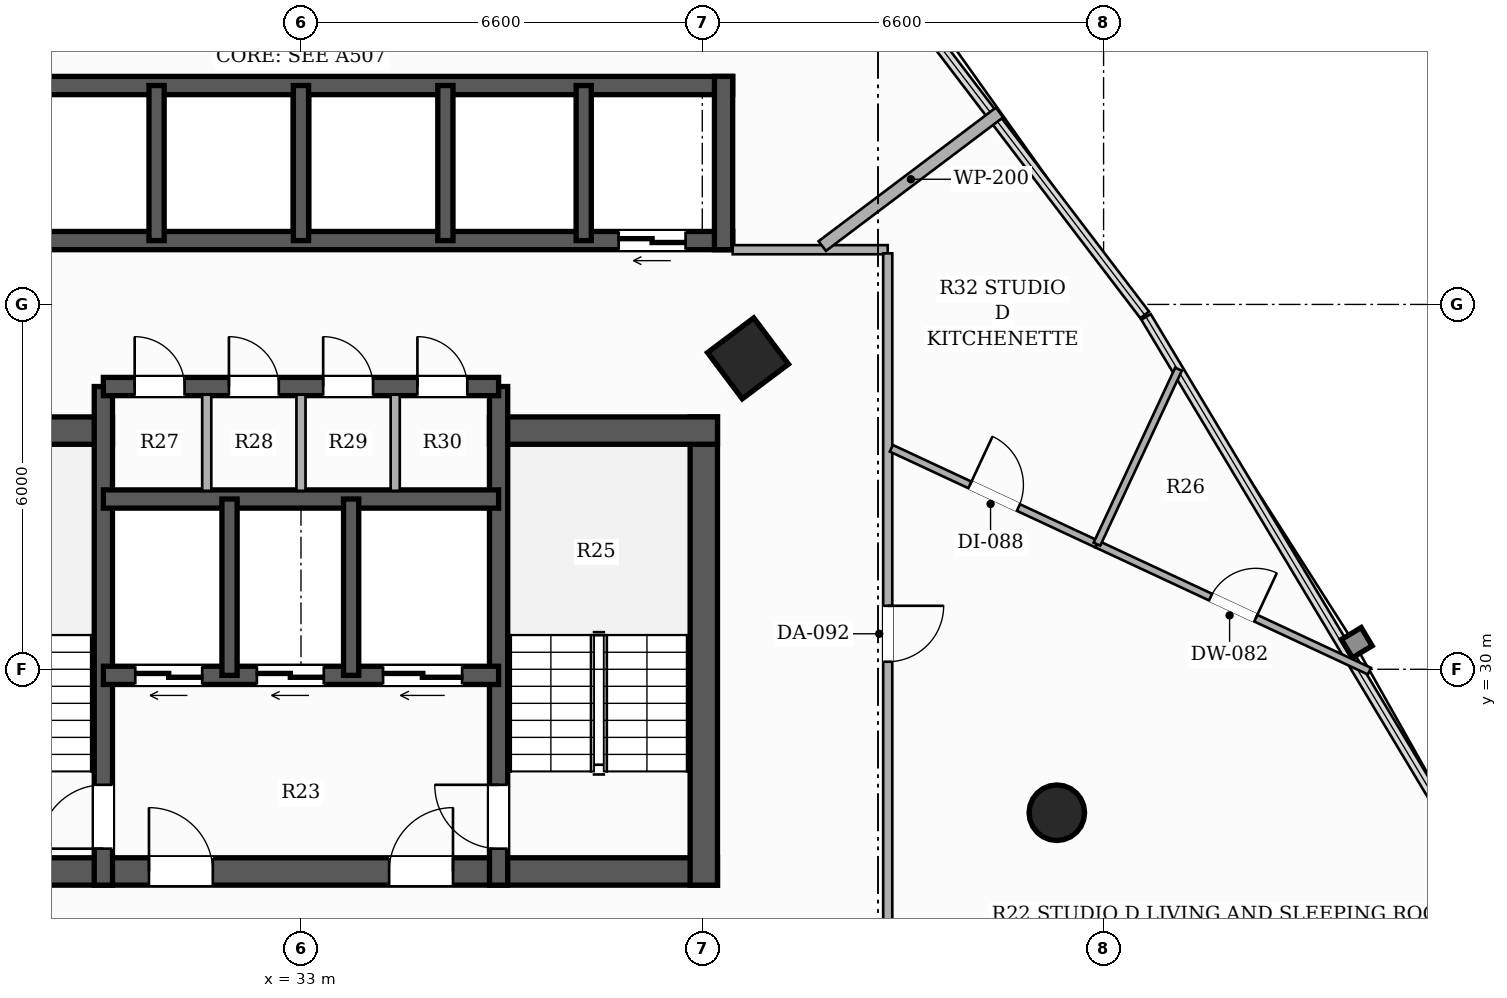
"""IFC4 building model, lengths in metres.
Left out: names, types, materials, properties, quantities, classifications, styles, units other than length and angle.
Written with IfcOpenShell. Run it as: python <this file> out.ifc"""

import sys

from ifc_helpers import new_model, si_unit, direction, frame, frame_2d, origin, origin_2d, place, context, subcontext, project, spatial, rectangle, hollow_rectangle, hollow_circle, extrude, element, fill, save


model = new_model("IFC4")
c1 = context("Model", 3, precision=1e-05, world=origin(), true_north=direction((0.0, 1.0)))
c2 = subcontext(c1, "Body", "Model", "MODEL_VIEW")
j1 = project(units=[si_unit("LENGTHUNIT", "METRE"), si_unit("PLANEANGLEUNIT", "RADIAN")], contexts=[c1])
p1 = place(None, origin())
s1 = spatial("IfcSite", under=j1, at=p1, CompositionType="ELEMENT")
p2 = place(p1, origin())
s2 = spatial("IfcBuilding", under=s1, at=p2, CompositionType="ELEMENT")
p3 = place(p2, frame((0.0, 0.0, 46.7)))
s3 = spatial("IfcBuildingStorey", under=s2, at=p3, CompositionType="ELEMENT", Elevation=46.7)
p4 = place(p3, frame((26.15, 26.675, 0.0), z_axis=(0.0, 0.0, 1.0), x_axis=(1.0, 0.0, 0.0)))
e1 = element("IfcWall", 1, at=p4, inside=s3, PredefinedType="SHEAR", context=c2, shape_type="SweptSolid", body=[
    extrude(rectangle(XDim=13.7, YDim=0.45, at=frame_2d((6.85, 0.0))), origin(), (0.0, 0.0, 1.0), 3.3),
])
p5 = place(p4, frame((4.35, 0.0, 0.0)))
e2 = element("IfcOpeningElement", 2, at=p5, cuts=e1, PredefinedType="OPENING", context=c2, shape_type="SweptSolid", body=[
    extrude(rectangle(XDim=1.05, YDim=2.15, at=frame_2d((0.525, 1.075))), frame((0.0, 0.235, 0.0), z_axis=(0.0, -1.0, 0.0), x_axis=(1.0, 0.0, 0.0)), (0.0, 0.0, 1.0), 0.47),
])
p6 = place(p4, frame((8.3, 0.0, 0.0)))
e3 = element("IfcOpeningElement", 3, at=p6, cuts=e1, PredefinedType="OPENING", context=c2, shape_type="SweptSolid", body=[
    extrude(rectangle(XDim=1.05, YDim=2.15, at=frame_2d((0.525, 1.075))), frame((0.0, 0.235, 0.0), z_axis=(0.0, -1.0, 0.0), x_axis=(1.0, 0.0, 0.0)), (0.0, 0.0, 1.0), 0.47),
])
p7 = place(p3, frame((26.15, 33.925, 0.0), z_axis=(0.0, 0.0, 1.0), x_axis=(1.0, 0.0, 0.0)))
e4 = element("IfcWall", 4, at=p7, inside=s3, PredefinedType="SHEAR", context=c2, shape_type="SweptSolid", body=[
    extrude(rectangle(XDim=3.75, YDim=0.45, at=frame_2d((1.875, 0.0))), origin(), (0.0, 0.0, 1.0), 3.3),
])
p8 = place(p3, frame((39.625, 26.45, 0.0), z_axis=(0.0, 0.0, 1.0), x_axis=(0.0, 1.0, 0.0)))
e5 = element("IfcWall", 5, at=p8, inside=s3, PredefinedType="SHEAR", context=c2, shape_type="SweptSolid", body=[
    extrude(rectangle(XDim=7.7, YDim=0.45, at=frame_2d((3.85, 0.0))), origin(), (0.0, 0.0, 1.0), 3.3),
])
p9 = place(p3, frame((36.1, 33.925, 0.0), z_axis=(0.0, 0.0, 1.0), x_axis=(1.0, 0.0, 0.0)))
e6 = element("IfcWall", 6, at=p9, inside=s3, PredefinedType="SHEAR", context=c2, shape_type="SweptSolid", body=[
    extrude(rectangle(XDim=3.75, YDim=0.45, at=frame_2d((1.875, 0.0))), origin(), (0.0, 0.0, 1.0), 3.3),
])
p10 = place(p3, frame((29.75, 26.45, 0.0), z_axis=(0.0, 0.0, 1.0), x_axis=(0.0, 1.0, 0.0)))
e7 = element("IfcWall", 7, at=p10, inside=s3, PredefinedType="SHEAR", context=c2, shape_type="SweptSolid", body=[
    extrude(rectangle(XDim=8.2, YDim=0.3, at=frame_2d((4.1, 0.0))), origin(), (0.0, 0.0, 1.0), 3.3),
])
p11 = place(p10, frame((0.6, 0.0, 0.0)))
e8 = element("IfcOpeningElement", 8, at=p11, cuts=e7, PredefinedType="OPENING", context=c2, shape_type="SweptSolid", body=[
    extrude(rectangle(XDim=1.05, YDim=2.15, at=frame_2d((0.525, 1.075))), frame((0.0, 0.16, 0.0), z_axis=(0.0, -1.0, 0.0), x_axis=(1.0, 0.0, 0.0)), (0.0, 0.0, 1.0), 0.32),
])
p12 = place(p3, frame((36.25, 26.45, 0.0), z_axis=(0.0, 0.0, 1.0), x_axis=(0.0, 1.0, 0.0)))
e9 = element("IfcWall", 9, at=p12, inside=s3, PredefinedType="SHEAR", context=c2, shape_type="SweptSolid", body=[
    extrude(rectangle(XDim=8.2, YDim=0.3, at=frame_2d((4.1, 0.0))), origin(), (0.0, 0.0, 1.0), 3.3),
])
p13 = place(p12, frame((0.6, 0.0, 0.0)))
e10 = element("IfcOpeningElement", 10, at=p13, cuts=e9, PredefinedType="OPENING", context=c2, shape_type="SweptSolid", body=[
    extrude(rectangle(XDim=1.05, YDim=2.15, at=frame_2d((0.525, 1.075))), frame((0.0, 0.16, 0.0), z_axis=(0.0, -1.0, 0.0), x_axis=(1.0, 0.0, 0.0)), (0.0, 0.0, 1.0), 0.32),
])
p14 = place(p3, frame((36.25, 29.9, 0.0), z_axis=(0.0, 0.0, 1.0), x_axis=(-1.0, 0.0, 0.0)))
e11 = element("IfcWall", 11, at=p14, inside=s3, PredefinedType="SHEAR", context=c2, shape_type="SweptSolid", body=[
    extrude(rectangle(XDim=6.5, YDim=0.3, at=frame_2d((3.25, 0.0))), origin(), (0.0, 0.0, 1.0), 3.3),
])
p15 = place(p14, frame((4.875, 0.0, 0.0)))
e12 = element("IfcOpeningElement", 12, at=p15, cuts=e11, PredefinedType="OPENING", context=c2, shape_type="SweptSolid", body=[
    extrude(rectangle(XDim=1.1, YDim=2.2, at=frame_2d((0.55, 1.1))), frame((0.0, 0.16, 0.0), z_axis=(0.0, -1.0, 0.0), x_axis=(1.0, 0.0, 0.0)), (0.0, 0.0, 1.0), 0.32),
])
p16 = place(p14, frame((2.875, 0.0, 0.0)))
e13 = element("IfcOpeningElement", 13, at=p16, cuts=e11, PredefinedType="OPENING", context=c2, shape_type="SweptSolid", body=[
    extrude(rectangle(XDim=1.1, YDim=2.2, at=frame_2d((0.55, 1.1))), frame((0.0, 0.16, 0.0), z_axis=(0.0, -1.0, 0.0), x_axis=(1.0, 0.0, 0.0)), (0.0, 0.0, 1.0), 0.32),
])
p17 = place(p14, frame((0.6, 0.0, 0.0)))
e14 = element("IfcOpeningElement", 14, at=p17, cuts=e11, PredefinedType="OPENING", context=c2, shape_type="SweptSolid", body=[
    extrude(rectangle(XDim=1.3, YDim=2.2, at=frame_2d((0.65, 1.1))), frame((0.0, 0.16, 0.0), z_axis=(0.0, -1.0, 0.0), x_axis=(1.0, 0.0, 0.0)), (0.0, 0.0, 1.0), 0.32),
])
p18 = place(p3, frame((29.75, 32.8, 0.0), z_axis=(0.0, 0.0, 1.0), x_axis=(1.0, 0.0, 0.0)))
e15 = element("IfcWall", 15, at=p18, inside=s3, PredefinedType="SHEAR", context=c2, shape_type="SweptSolid", body=[
    extrude(rectangle(XDim=6.5, YDim=0.3, at=frame_2d((3.25, 0.0))), origin(), (0.0, 0.0, 1.0), 3.3),
])
for number, where, z_axis, x_axis in (
    (16, (31.825, 29.9, 0.0), (0.0, 0.0, 1.0), (0.0, 1.0, 0.0)),
    (17, (33.825, 29.9, 0.0), (0.0, 0.0, 1.0), (0.0, 1.0, 0.0)),
):
    element("IfcWall", number, at=place(p3, frame(where, z_axis=z_axis, x_axis=x_axis)), inside=s3, PredefinedType="SHEAR", context=c2, shape_type="SweptSolid", body=[
        extrude(rectangle(XDim=2.9, YDim=0.25, at=frame_2d((1.45, 0.0))), origin(), (0.0, 0.0, 1.0), 3.3),
    ])
p19 = place(p3, frame((29.75, 34.65, 0.0), z_axis=(0.0, 0.0, 1.0), x_axis=(1.0, 0.0, 0.0)))
e18 = element("IfcWall", 18, at=p19, inside=s3, PredefinedType="SHEAR", context=c2, shape_type="SweptSolid", body=[
    extrude(rectangle(XDim=6.5, YDim=0.3, at=frame_2d((3.25, 0.0))), origin(), (0.0, 0.0, 1.0), 3.3),
])
p20 = place(p19, frame((0.515, 0.0, 0.0)))
e19 = element("IfcOpeningElement", 19, at=p20, cuts=e18, PredefinedType="OPENING", context=c2, shape_type="SweptSolid", body=[
    extrude(rectangle(XDim=0.82, YDim=2.1, at=frame_2d((0.41, 1.05))), frame((0.0, 0.16, 0.0), z_axis=(0.0, -1.0, 0.0), x_axis=(1.0, 0.0, 0.0)), (0.0, 0.0, 1.0), 0.32),
])
p21 = place(p19, frame((2.065, 0.0, 0.0)))
e20 = element("IfcOpeningElement", 20, at=p21, cuts=e18, PredefinedType="OPENING", context=c2, shape_type="SweptSolid", body=[
    extrude(rectangle(XDim=0.82, YDim=2.1, at=frame_2d((0.41, 1.05))), frame((0.0, 0.16, 0.0), z_axis=(0.0, -1.0, 0.0), x_axis=(1.0, 0.0, 0.0)), (0.0, 0.0, 1.0), 0.32),
])
p22 = place(p19, frame((3.615, 0.0, 0.0)))
e21 = element("IfcOpeningElement", 21, at=p22, cuts=e18, PredefinedType="OPENING", context=c2, shape_type="SweptSolid", body=[
    extrude(rectangle(XDim=0.82, YDim=2.1, at=frame_2d((0.41, 1.05))), frame((0.0, 0.16, 0.0), z_axis=(0.0, -1.0, 0.0), x_axis=(1.0, 0.0, 0.0)), (0.0, 0.0, 1.0), 0.32),
])
p23 = place(p19, frame((5.165, 0.0, 0.0)))
e22 = element("IfcOpeningElement", 22, at=p23, cuts=e18, PredefinedType="OPENING", context=c2, shape_type="SweptSolid", body=[
    extrude(rectangle(XDim=0.82, YDim=2.1, at=frame_2d((0.41, 1.05))), frame((0.0, 0.16, 0.0), z_axis=(0.0, -1.0, 0.0), x_axis=(1.0, 0.0, 0.0)), (0.0, 0.0, 1.0), 0.32),
])
p24 = place(p3, frame((40.1, 37.05, 0.0), z_axis=(0.0, 0.0, 1.0), x_axis=(-1.0, 0.0, 0.0)))
e23 = element("IfcWall", 23, at=p24, inside=s3, PredefinedType="SHEAR", context=c2, shape_type="SweptSolid", body=[
    extrude(rectangle(XDim=14.2, YDim=0.3, at=frame_2d((7.1, 0.0))), origin(), (0.0, 0.0, 1.0), 3.3),
])
p25 = place(p24, frame((12.325, 0.0, 0.0)))
e24 = element("IfcOpeningElement", 24, at=p25, cuts=e23, PredefinedType="OPENING", context=c2, shape_type="SweptSolid", body=[
    extrude(rectangle(XDim=1.1, YDim=2.2, at=frame_2d((0.55, 1.1))), frame((0.0, 0.16, 0.0), z_axis=(0.0, -1.0, 0.0), x_axis=(1.0, 0.0, 0.0)), (0.0, 0.0, 1.0), 0.32),
])
p26 = place(p24, frame((0.775, 0.0, 0.0)))
e25 = element("IfcOpeningElement", 25, at=p26, cuts=e23, PredefinedType="OPENING", context=c2, shape_type="SweptSolid", body=[
    extrude(rectangle(XDim=1.1, YDim=2.2, at=frame_2d((0.55, 1.1))), frame((0.0, 0.16, 0.0), z_axis=(0.0, -1.0, 0.0), x_axis=(1.0, 0.0, 0.0)), (0.0, 0.0, 1.0), 0.32),
])
p27 = place(p3, frame((25.9, 39.6, 0.0), z_axis=(0.0, 0.0, 1.0), x_axis=(1.0, 0.0, 0.0)))
e26 = element("IfcWall", 26, at=p27, inside=s3, PredefinedType="SHEAR", context=c2, shape_type="SweptSolid", body=[
    extrude(rectangle(XDim=14.2, YDim=0.3, at=frame_2d((7.1, 0.0))), origin(), (0.0, 0.0, 1.0), 3.3),
])
p28 = place(p3, frame((39.95, 36.9, 0.0), z_axis=(0.0, 0.0, 1.0), x_axis=(0.0, 1.0, 0.0)))
e27 = element("IfcWall", 27, at=p28, inside=s3, PredefinedType="SHEAR", context=c2, shape_type="SweptSolid", body=[
    extrude(rectangle(XDim=2.85, YDim=0.3, at=frame_2d((1.425, 0.0))), origin(), (0.0, 0.0, 1.0), 3.3),
])
for number, where, z_axis, x_axis in (
    (28, (30.625, 37.05, 0.0), (0.0, 0.0, 1.0), (0.0, 1.0, 0.0)),
    (29, (33.0, 37.05, 0.0), (0.0, 0.0, 1.0), (0.0, 1.0, 0.0)),
    (30, (35.375, 37.05, 0.0), (0.0, 0.0, 1.0), (0.0, 1.0, 0.0)),
    (31, (37.65, 37.05, 0.0), (0.0, 0.0, 1.0), (0.0, 1.0, 0.0)),
):
    element("IfcWall", number, at=place(p3, frame(where, z_axis=z_axis, x_axis=x_axis)), inside=s3, PredefinedType="SHEAR", context=c2, shape_type="SweptSolid", body=[
        extrude(rectangle(XDim=2.55, YDim=0.25, at=frame_2d((1.275, 0.0))), origin(), (0.0, 0.0, 1.0), 3.3),
    ])
p29 = place(p3, frame((45.431, 27.641, 0.0), z_axis=(0.0, 0.0, 1.0), x_axis=(1.0, 0.0, 0.0)))
e32 = element("IfcColumn", 32, at=p29, inside=s3, PredefinedType="COLUMN", context=c2, shape_type="SweptSolid", body=[
    extrude(hollow_circle(Radius=0.457, WallThickness=0.025, at=origin_2d()), origin(), (0.0, 0.0, 1.0), 3.3),
])
p30 = place(p3, frame((40.352, 35.113, 0.0), z_axis=(0.0, 0.0, 1.0), x_axis=(-0.600420225326, 0.799684658487, 0.0)))
e33 = element("IfcColumn", 33, at=p30, inside=s3, PredefinedType="COLUMN", context=c2, shape_type="SweptSolid", body=[
    extrude(hollow_rectangle(XDim=0.95, YDim=0.95, WallThickness=0.032, at=origin_2d()), origin(), (0.0, 0.0, 1.0), 3.3),
])
for number, where, z_axis, x_axis in (
    (34, (31.45, 32.935, 0.0), (0.0, 0.0, 1.0), (0.0, 1.0, 0.0)),
    (35, (33.0, 32.935, 0.0), (0.0, 0.0, 1.0), (0.0, 1.0, 0.0)),
    (36, (34.55, 32.935, 0.0), (0.0, 0.0, 1.0), (0.0, 1.0, 0.0)),
):
    element("IfcWall", number, at=place(p3, frame(where, z_axis=z_axis, x_axis=x_axis)), inside=s3, PredefinedType="PARTITIONING", context=c2, shape_type="SweptSolid", body=[
        extrude(rectangle(XDim=1.58, YDim=0.15, at=frame_2d((0.79, 0.0))), origin(), (0.0, 0.0, 1.0), 3.06),
    ])
p31 = place(p3, frame((40.1, 36.9, 0.0), z_axis=(0.0, 0.0, 1.0), x_axis=(1.0, 0.0, 0.0)))
e37 = element("IfcWall", 37, at=p31, inside=s3, PredefinedType="PARTITIONING", context=c2, shape_type="SweptSolid", body=[
    extrude(rectangle(XDim=2.55, YDim=0.15, at=frame_2d((1.275, 0.0))), origin(), (0.0, 0.0, 1.0), 2.413),
])
p32 = place(p3, frame((42.65, 36.84, 0.0), z_axis=(0.0, 0.0, 1.0), x_axis=(0.0, -1.0, 0.0)))
e38 = element("IfcWall", 38, at=p32, inside=s3, PredefinedType="PARTITIONING", context=c2, shape_type="SweptSolid", body=[
    extrude(rectangle(XDim=25.04, YDim=0.15, at=frame_2d((12.52, 0.0))), origin(), (0.0, 0.0, 1.0), 2.413),
])
p33 = place(p32, frame((16.466, 0.0, 0.0)))
e39 = element("IfcOpeningElement", 39, at=p33, cuts=e38, PredefinedType="OPENING", context=c2, shape_type="SweptSolid", body=[
    extrude(rectangle(XDim=0.92, YDim=2.15, at=frame_2d((0.46, 1.075))), frame((0.0, 0.085, 0.0), z_axis=(0.0, -1.0, 0.0), x_axis=(1.0, 0.0, 0.0)), (0.0, 0.0, 1.0), 0.17),
])
p34 = place(p32, frame((5.796, 0.0, 0.0)))
e40 = element("IfcOpeningElement", 40, at=p34, cuts=e38, PredefinedType="OPENING", context=c2, shape_type="SweptSolid", body=[
    extrude(rectangle(XDim=0.92, YDim=2.15, at=frame_2d((0.46, 1.075))), frame((0.0, 0.085, 0.0), z_axis=(0.0, -1.0, 0.0), x_axis=(1.0, 0.0, 0.0)), (0.0, 0.0, 1.0), 0.17),
])
p35 = place(p3, frame((44.489, 39.157, 0.0), z_axis=(0.0, 0.0, 1.0), x_axis=(-0.798682095895, -0.601753196665, 0.0)))
e41 = element("IfcWall", 41, at=p35, inside=s3, PredefinedType="PARTITIONING", context=c2, shape_type="SweptSolid", body=[
    extrude(rectangle(XDim=3.651, YDim=0.2, at=frame_2d((1.826, 0.0))), origin(), (0.0, 0.0, 1.0), 3.06),
])
p36 = place(p3, frame((46.091, 32.058, 0.0), z_axis=(0.0, 0.0, 1.0), x_axis=(0.906338250566, -0.422552926343, 0.0)))
e42 = element("IfcWall", 42, at=p36, inside=s3, PredefinedType="PARTITIONING", context=c2, shape_type="SweptSolid", body=[
    extrude(rectangle(XDim=4.944, YDim=0.12, at=frame_2d((2.472, 0.0))), origin(), (0.0, 0.0, 1.0), 3.06),
])
p37 = place(p36, frame((2.062, 0.0, 0.0)))
e43 = element("IfcOpeningElement", 43, at=p37, cuts=e42, PredefinedType="OPENING", context=c2, shape_type="SweptSolid", body=[
    extrude(rectangle(XDim=0.82, YDim=2.1, at=frame_2d((0.41, 1.05))), frame((0.0, 0.07, 0.0), z_axis=(0.0, -1.0, 0.0), x_axis=(1.0, 0.0, 0.0)), (0.0, 0.0, 1.0), 0.14),
])
p38 = place(p3, frame((42.71, 33.634, 0.0), z_axis=(0.0, 0.0, 1.0), x_axis=(0.906380338854, -0.422462638985, 0.0)))
e44 = element("IfcWall", 44, at=p38, inside=s3, PredefinedType="PARTITIONING", context=c2, shape_type="SweptSolid", body=[
    extrude(rectangle(XDim=3.73, YDim=0.12, at=frame_2d((1.865, 0.0))), origin(), (0.0, 0.0, 1.0), 3.06),
])
p39 = place(p38, frame((1.425, 0.0, 0.0)))
e45 = element("IfcOpeningElement", 45, at=p39, cuts=e44, PredefinedType="OPENING", context=c2, shape_type="SweptSolid", body=[
    extrude(rectangle(XDim=0.88, YDim=2.1, at=frame_2d((0.44, 1.05))), frame((0.0, 0.07, 0.0), z_axis=(0.0, -1.0, 0.0), x_axis=(1.0, 0.0, 0.0)), (0.0, 0.0, 1.0), 0.14),
])
p40 = place(p3, frame((46.091, 32.058, 0.0), z_axis=(0.0, 0.0, 1.0), x_axis=(0.422430644664, 0.906395250677, 0.0)))
e46 = element("IfcWall", 46, at=p40, inside=s3, PredefinedType="PARTITIONING", context=c2, shape_type="SweptSolid", body=[
    extrude(rectangle(XDim=3.174, YDim=0.12, at=frame_2d((1.587, 0.0))), origin(), (0.0, 0.0, 1.0), 3.06),
])
p41 = place(p11, origin())
e47 = element("IfcDoor", 47, at=p41, inside=s3, OperationType="SINGLE_SWING_LEFT", PredefinedType="DOOR", context=c2, shape_type="SweptSolid", body=[
    extrude(rectangle(XDim=1.05, YDim=2.15, at=frame_2d((0.525, 1.075))), frame((0.0, 0.025, 0.0), z_axis=(0.0, -1.0, 0.0), x_axis=(1.0, 0.0, 0.0)), (0.0, 0.0, 1.0), 0.05),
])
fill(e8, e47)
p42 = place(p13, origin())
e48 = element("IfcDoor", 48, at=p42, inside=s3, OperationType="SINGLE_SWING_RIGHT", PredefinedType="DOOR", context=c2, shape_type="SweptSolid", body=[
    extrude(rectangle(XDim=1.05, YDim=2.15, at=frame_2d((0.525, 1.075))), frame((0.0, 0.025, 0.0), z_axis=(0.0, -1.0, 0.0), x_axis=(1.0, 0.0, 0.0)), (0.0, 0.0, 1.0), 0.05),
])
fill(e10, e48)
p43 = place(p5, origin())
e49 = element("IfcDoor", 49, at=p43, inside=s3, OperationType="SINGLE_SWING_LEFT", PredefinedType="DOOR", context=c2, shape_type="SweptSolid", body=[
    extrude(rectangle(XDim=1.05, YDim=2.15, at=frame_2d((0.525, 1.075))), frame((0.0, 0.025, 0.0), z_axis=(0.0, -1.0, 0.0), x_axis=(1.0, 0.0, 0.0)), (0.0, 0.0, 1.0), 0.05),
])
fill(e2, e49)
p44 = place(p6, origin())
e50 = element("IfcDoor", 50, at=p44, inside=s3, OperationType="SINGLE_SWING_RIGHT", PredefinedType="DOOR", context=c2, shape_type="SweptSolid", body=[
    extrude(rectangle(XDim=1.05, YDim=2.15, at=frame_2d((0.525, 1.075))), frame((0.0, 0.025, 0.0), z_axis=(0.0, -1.0, 0.0), x_axis=(1.0, 0.0, 0.0)), (0.0, 0.0, 1.0), 0.05),
])
fill(e3, e50)
p45 = place(p15, origin())
e51 = element("IfcDoor", 51, at=p45, inside=s3, OperationType="DOUBLE_DOOR_SLIDING", PredefinedType="DOOR", context=c2, shape_type="SweptSolid", body=[
    extrude(rectangle(XDim=1.1, YDim=2.2, at=frame_2d((0.55, 1.1))), frame((0.0, 0.025, 0.0), z_axis=(0.0, -1.0, 0.0), x_axis=(1.0, 0.0, 0.0)), (0.0, 0.0, 1.0), 0.05),
])
fill(e12, e51)
p46 = place(p16, origin())
e52 = element("IfcDoor", 52, at=p46, inside=s3, OperationType="DOUBLE_DOOR_SLIDING", PredefinedType="DOOR", context=c2, shape_type="SweptSolid", body=[
    extrude(rectangle(XDim=1.1, YDim=2.2, at=frame_2d((0.55, 1.1))), frame((0.0, 0.025, 0.0), z_axis=(0.0, -1.0, 0.0), x_axis=(1.0, 0.0, 0.0)), (0.0, 0.0, 1.0), 0.05),
])
fill(e13, e52)
p47 = place(p17, origin())
e53 = element("IfcDoor", 53, at=p47, inside=s3, OperationType="DOUBLE_DOOR_SLIDING", PredefinedType="DOOR", context=c2, shape_type="SweptSolid", body=[
    extrude(rectangle(XDim=1.3, YDim=2.2, at=frame_2d((0.65, 1.1))), frame((0.0, 0.025, 0.0), z_axis=(0.0, -1.0, 0.0), x_axis=(1.0, 0.0, 0.0)), (0.0, 0.0, 1.0), 0.05),
])
fill(e14, e53)
p48 = place(p26, origin())
e54 = element("IfcDoor", 54, at=p48, inside=s3, OperationType="DOUBLE_DOOR_SLIDING", PredefinedType="DOOR", context=c2, shape_type="SweptSolid", body=[
    extrude(rectangle(XDim=1.1, YDim=2.2, at=frame_2d((0.55, 1.1))), frame((0.0, 0.025, 0.0), z_axis=(0.0, -1.0, 0.0), x_axis=(1.0, 0.0, 0.0)), (0.0, 0.0, 1.0), 0.05),
])
fill(e25, e54)
p49 = place(p20, origin())
e55 = element("IfcDoor", 55, at=p49, inside=s3, OperationType="SINGLE_SWING_LEFT", PredefinedType="DOOR", context=c2, shape_type="SweptSolid", body=[
    extrude(rectangle(XDim=0.82, YDim=2.1, at=frame_2d((0.41, 1.05))), frame((0.0, 0.025, 0.0), z_axis=(0.0, -1.0, 0.0), x_axis=(1.0, 0.0, 0.0)), (0.0, 0.0, 1.0), 0.05),
])
fill(e19, e55)
p50 = place(p21, origin())
e56 = element("IfcDoor", 56, at=p50, inside=s3, OperationType="SINGLE_SWING_LEFT", PredefinedType="DOOR", context=c2, shape_type="SweptSolid", body=[
    extrude(rectangle(XDim=0.82, YDim=2.1, at=frame_2d((0.41, 1.05))), frame((0.0, 0.025, 0.0), z_axis=(0.0, -1.0, 0.0), x_axis=(1.0, 0.0, 0.0)), (0.0, 0.0, 1.0), 0.05),
])
fill(e20, e56)
p51 = place(p22, origin())
e57 = element("IfcDoor", 57, at=p51, inside=s3, OperationType="SINGLE_SWING_LEFT", PredefinedType="DOOR", context=c2, shape_type="SweptSolid", body=[
    extrude(rectangle(XDim=0.82, YDim=2.1, at=frame_2d((0.41, 1.05))), frame((0.0, 0.025, 0.0), z_axis=(0.0, -1.0, 0.0), x_axis=(1.0, 0.0, 0.0)), (0.0, 0.0, 1.0), 0.05),
])
fill(e21, e57)
p52 = place(p23, origin())
e58 = element("IfcDoor", 58, at=p52, inside=s3, OperationType="SINGLE_SWING_LEFT", PredefinedType="DOOR", context=c2, shape_type="SweptSolid", body=[
    extrude(rectangle(XDim=0.82, YDim=2.1, at=frame_2d((0.41, 1.05))), frame((0.0, 0.025, 0.0), z_axis=(0.0, -1.0, 0.0), x_axis=(1.0, 0.0, 0.0)), (0.0, 0.0, 1.0), 0.05),
])
fill(e22, e58)
p53 = place(p34, origin())
e59 = element("IfcDoor", 59, at=p53, inside=s3, OperationType="SINGLE_SWING_LEFT", PredefinedType="DOOR", context=c2, shape_type="SweptSolid", body=[
    extrude(rectangle(XDim=0.92, YDim=2.15, at=frame_2d((0.46, 1.075))), frame((0.0, 0.025, 0.0), z_axis=(0.0, -1.0, 0.0), x_axis=(1.0, 0.0, 0.0)), (0.0, 0.0, 1.0), 0.05),
])
fill(e40, e59)
p54 = place(p37, origin())
e60 = element("IfcDoor", 60, at=p54, inside=s3, OperationType="SINGLE_SWING_RIGHT", PredefinedType="DOOR", context=c2, shape_type="SweptSolid", body=[
    extrude(rectangle(XDim=0.82, YDim=2.1, at=frame_2d((0.41, 1.05))), frame((0.0, 0.025, 0.0), z_axis=(0.0, -1.0, 0.0), x_axis=(1.0, 0.0, 0.0)), (0.0, 0.0, 1.0), 0.05),
])
fill(e43, e60)
p55 = place(p39, origin())
e61 = element("IfcDoor", 61, at=p55, inside=s3, OperationType="SINGLE_SWING_LEFT", PredefinedType="DOOR", context=c2, shape_type="SweptSolid", body=[
    extrude(rectangle(XDim=0.88, YDim=2.1, at=frame_2d((0.44, 1.05))), frame((0.0, 0.025, 0.0), z_axis=(0.0, -1.0, 0.0), x_axis=(1.0, 0.0, 0.0)), (0.0, 0.0, 1.0), 0.05),
])
fill(e45, e61)
save(model, sys.argv[1])
